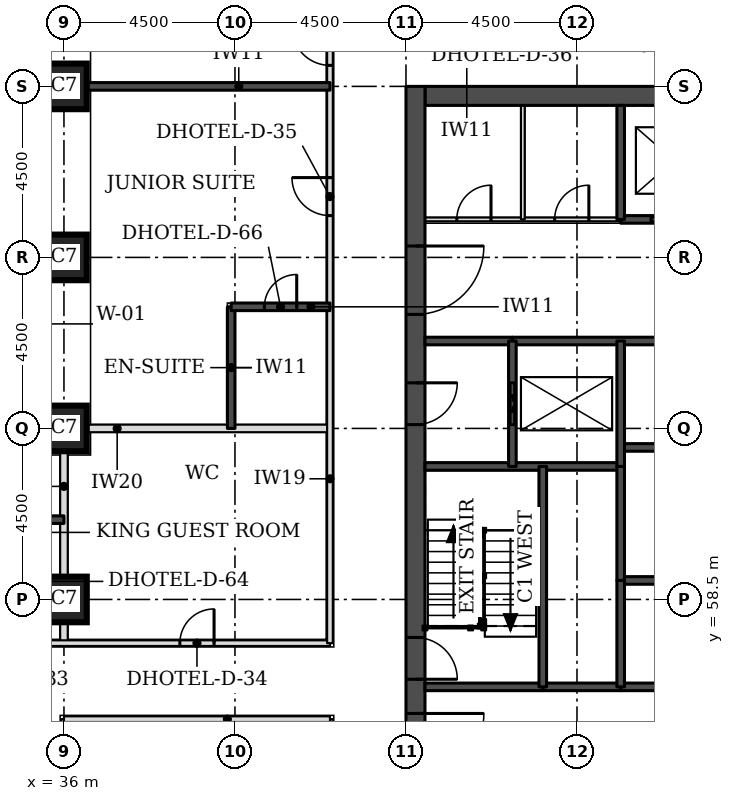
"""IFC4 building model, lengths in metres.
Left out: names, types, materials, properties, quantities, classifications, styles, units other than length and angle.
Written with IfcOpenShell. Run it as: python <this file> out.ifc"""

import sys

from ifc_helpers import new_model, si_unit, direction, frame, frame_2d, origin, origin_2d, place, context, subcontext, project, spatial, rectangle, extrude, element, fill, save


model = new_model("IFC4")
c1 = context("Model", 3, precision=1e-05, world=origin(), true_north=direction((0.0, 1.0)))
c2 = subcontext(c1, "Body", "Model", "MODEL_VIEW")
j1 = project(units=[si_unit("LENGTHUNIT", "METRE"), si_unit("PLANEANGLEUNIT", "RADIAN")], contexts=[c1])
p1 = place(None, origin())
s1 = spatial("IfcSite", under=j1, at=p1, CompositionType="ELEMENT")
p2 = place(p1, origin())
s2 = spatial("IfcBuilding", under=s1, at=p2, CompositionType="ELEMENT")
p3 = place(p2, frame((0.0, 0.0, 59.4)))
s3 = spatial("IfcBuildingStorey", under=s2, at=p3, CompositionType="ELEMENT", Elevation=59.4)
for number, where, z_axis, x_axis in (
    (1, (36.0, 58.5, 0.0), (0.0, 0.0, 1.0), (1.0, 0.0, 0.0)),
    (2, (36.0, 63.0, 0.0), (0.0, 0.0, 1.0), (1.0, 0.0, 0.0)),
    (3, (36.0, 67.5, 0.0), (0.0, 0.0, 1.0), (1.0, 0.0, 0.0)),
    (4, (36.0, 72.0, 0.0), (0.0, 0.0, 1.0), (1.0, 0.0, 0.0)),
):
    element("IfcColumn", number, at=place(p3, frame(where, z_axis=z_axis, x_axis=x_axis)), inside=s3, PredefinedType="COLUMN", context=c2, shape_type="SweptSolid", body=[
        extrude(rectangle(XDim=1.2, YDim=1.2, at=origin_2d()), origin(), (0.0, 0.0, 1.0), 3.3),
    ])
p4 = place(p3, frame((45.5, 71.75, 0.0), z_axis=(0.0, 0.0, 1.0), x_axis=(1.0, 0.0, 0.0)))
e5 = element("IfcWall", 5, at=p4, inside=s3, PredefinedType="SHEAR", context=c2, shape_type="SweptSolid", body=[
    extrude(rectangle(XDim=21.5, YDim=0.5, at=frame_2d((10.75, 0.0))), origin(), (0.0, 0.0, 1.0), 3.3),
])
p5 = place(p3, frame((45.25, 49.5, 0.0), z_axis=(0.0, 0.0, 1.0), x_axis=(0.0, 1.0, 0.0)))
e6 = element("IfcWall", 6, at=p5, inside=s3, PredefinedType="SHEAR", context=c2, shape_type="SweptSolid", body=[
    extrude(rectangle(XDim=22.5, YDim=0.5, at=frame_2d((11.25, 0.0))), origin(), (0.0, 0.0, 1.0), 3.3),
])
p6 = place(p5, frame((4.2, 0.0, 0.0)))
e7 = element("IfcOpeningElement", 7, at=p6, cuts=e6, PredefinedType="OPENING", context=c2, shape_type="SweptSolid", body=[
    extrude(rectangle(XDim=1.8, YDim=2.1, at=frame_2d((0.9, 1.05))), frame((0.0, 0.26, 0.0), z_axis=(0.0, -1.0, 0.0), x_axis=(1.0, 0.0, 0.0)), (0.0, 0.0, 1.0), 0.52),
])
p7 = place(p5, frame((6.9, 0.0, 0.0)))
e8 = element("IfcOpeningElement", 8, at=p7, cuts=e6, PredefinedType="OPENING", context=c2, shape_type="SweptSolid", body=[
    extrude(rectangle(XDim=1.1, YDim=2.1, at=frame_2d((0.55, 1.05))), frame((0.0, 0.26, 0.0), z_axis=(0.0, -1.0, 0.0), x_axis=(1.0, 0.0, 0.0)), (0.0, 0.0, 1.0), 0.52),
])
p8 = place(p5, frame((13.6, 0.0, 0.0)))
e9 = element("IfcOpeningElement", 9, at=p8, cuts=e6, PredefinedType="OPENING", context=c2, shape_type="SweptSolid", body=[
    extrude(rectangle(XDim=1.1, YDim=2.1, at=frame_2d((0.55, 1.05))), frame((0.0, 0.26, 0.0), z_axis=(0.0, -1.0, 0.0), x_axis=(1.0, 0.0, 0.0)), (0.0, 0.0, 1.0), 0.52),
])
p9 = place(p5, frame((16.5, 0.0, 0.0)))
e10 = element("IfcOpeningElement", 10, at=p9, cuts=e6, PredefinedType="OPENING", context=c2, shape_type="SweptSolid", body=[
    extrude(rectangle(XDim=1.8, YDim=2.1, at=frame_2d((0.9, 1.05))), frame((0.0, 0.26, 0.0), z_axis=(0.0, -1.0, 0.0), x_axis=(1.0, 0.0, 0.0)), (0.0, 0.0, 1.0), 0.52),
])
p10 = place(p3, frame((36.0, 57.35, 0.0), z_axis=(0.0, 0.0, 1.0), x_axis=(0.0, 1.0, 0.0)))
e11 = element("IfcWall", 11, at=p10, inside=s3, PredefinedType="PARTITIONING", context=c2, shape_type="SweptSolid", body=[
    extrude(rectangle(XDim=5.05, YDim=0.2, at=frame_2d((2.525, 0.0))), origin(), (0.0, 0.0, 1.0), 2.33),
])
p11 = place(p3, frame((36.6, 63.0, 0.0), z_axis=(0.0, 0.0, 1.0), x_axis=(1.0, 0.0, 0.0)))
e12 = element("IfcWall", 12, at=p11, inside=s3, PredefinedType="PARTITIONING", context=c2, shape_type="SweptSolid", body=[
    extrude(rectangle(XDim=6.4, YDim=0.2, at=frame_2d((3.2, 0.0))), origin(), (0.0, 0.0, 1.0), 3.08),
])
p12 = place(p3, frame((43.0, 47.5, 0.0), z_axis=(0.0, 0.0, 1.0), x_axis=(0.0, 1.0, 0.0)))
e13 = element("IfcWall", 13, at=p12, inside=s3, PredefinedType="PARTITIONING", context=c2, shape_type="SweptSolid", body=[
    extrude(rectangle(XDim=7.85, YDim=0.15, at=frame_2d((3.925, 0.0))), origin(), (0.0, 0.0, 1.0), 3.08),
])
p13 = place(p12, frame((3.475, 0.0, 0.0)))
e14 = element("IfcOpeningElement", 14, at=p13, cuts=e13, PredefinedType="OPENING", context=c2, shape_type="SweptSolid", body=[
    extrude(rectangle(XDim=0.9, YDim=2.1, at=frame_2d((0.45, 1.05))), frame((0.0, 0.085, 0.0), z_axis=(0.0, -1.0, 0.0), x_axis=(1.0, 0.0, 0.0)), (0.0, 0.0, 1.0), 0.17),
])
p14 = place(p3, frame((36.0, 54.05, 0.0), z_axis=(0.0, 0.0, 1.0), x_axis=(0.0, 1.0, 0.0)))
e15 = element("IfcWall", 15, at=p14, inside=s3, PredefinedType="PARTITIONING", context=c2, shape_type="SweptSolid", body=[
    extrude(rectangle(XDim=1.3, YDim=0.15, at=frame_2d((0.65, 0.0))), origin(), (0.0, 0.0, 1.0), 2.33),
])
p15 = place(p3, frame((36.0, 55.35, 0.0), z_axis=(0.0, 0.0, 1.0), x_axis=(1.0, 0.0, 0.0)))
e16 = element("IfcWall", 16, at=p15, inside=s3, PredefinedType="PARTITIONING", context=c2, shape_type="SweptSolid", body=[
    extrude(rectangle(XDim=7.0, YDim=0.15, at=frame_2d((3.5, 0.0))), origin(), (0.0, 0.0, 1.0), 3.08),
])
p16 = place(p3, frame((29.38, 57.35, 0.0), z_axis=(0.0, 0.0, 1.0), x_axis=(1.0, 0.0, 0.0)))
e17 = element("IfcWall", 17, at=p16, inside=s3, PredefinedType="PARTITIONING", context=c2, shape_type="SweptSolid", body=[
    extrude(rectangle(XDim=13.62, YDim=0.15, at=frame_2d((6.81, 0.0))), origin(), (0.0, 0.0, 1.0), 3.08),
])
p17 = place(p16, frame((2.82, 0.0, 0.0)))
e18 = element("IfcOpeningElement", 18, at=p17, cuts=e17, PredefinedType="OPENING", context=c2, shape_type="SweptSolid", body=[
    extrude(rectangle(XDim=1.0, YDim=2.1, at=frame_2d((0.5, 1.05))), frame((0.0, 0.085, 0.0), z_axis=(0.0, -1.0, 0.0), x_axis=(1.0, 0.0, 0.0)), (0.0, 0.0, 1.0), 0.17),
])
p18 = place(p16, frame((0.67, 0.0, 0.0)))
e19 = element("IfcOpeningElement", 19, at=p18, cuts=e17, PredefinedType="OPENING", context=c2, shape_type="SweptSolid", body=[
    extrude(rectangle(XDim=1.0, YDim=2.1, at=frame_2d((0.5, 1.05))), frame((0.0, 0.085, 0.0), z_axis=(0.0, -1.0, 0.0), x_axis=(1.0, 0.0, 0.0)), (0.0, 0.0, 1.0), 0.17),
])
p19 = place(p16, frame((9.67, 0.0, 0.0)))
e20 = element("IfcOpeningElement", 20, at=p19, cuts=e17, PredefinedType="OPENING", context=c2, shape_type="SweptSolid", body=[
    extrude(rectangle(XDim=0.9, YDim=2.1, at=frame_2d((0.45, 1.05))), frame((0.0, 0.085, 0.0), z_axis=(0.0, -1.0, 0.0), x_axis=(1.0, 0.0, 0.0)), (0.0, 0.0, 1.0), 0.17),
])
p20 = place(p3, frame((43.0, 57.35, 0.0), z_axis=(0.0, 0.0, 1.0), x_axis=(0.0, 1.0, 0.0)))
e21 = element("IfcWall", 21, at=p20, inside=s3, PredefinedType="PARTITIONING", context=c2, shape_type="SweptSolid", body=[
    extrude(rectangle(XDim=16.65, YDim=0.15, at=frame_2d((8.325, 0.0))), origin(), (0.0, 0.0, 1.0), 3.08),
])
p21 = place(p20, frame((11.25, 0.0, 0.0)))
e22 = element("IfcOpeningElement", 22, at=p21, cuts=e21, PredefinedType="OPENING", context=c2, shape_type="SweptSolid", body=[
    extrude(rectangle(XDim=1.0, YDim=2.1, at=frame_2d((0.5, 1.05))), frame((0.0, 0.085, 0.0), z_axis=(0.0, -1.0, 0.0), x_axis=(1.0, 0.0, 0.0)), (0.0, 0.0, 1.0), 0.17),
])
p22 = place(p20, frame((15.203, 0.0, 0.0)))
e23 = element("IfcOpeningElement", 23, at=p22, cuts=e21, PredefinedType="OPENING", context=c2, shape_type="SweptSolid", body=[
    extrude(rectangle(XDim=1.0, YDim=2.1, at=frame_2d((0.5, 1.05))), frame((0.0, 0.085, 0.0), z_axis=(0.0, -1.0, 0.0), x_axis=(1.0, 0.0, 0.0)), (0.0, 0.0, 1.0), 0.17),
])
p23 = place(p3, frame((33.9, 60.6, 0.0), z_axis=(0.0, 0.0, 1.0), x_axis=(1.0, 0.0, 0.0)))
e24 = element("IfcWall", 24, at=p23, inside=s3, PredefinedType="SOLIDWALL", context=c2, shape_type="SweptSolid", body=[
    extrude(rectangle(XDim=2.1, YDim=0.2, at=frame_2d((1.05, 0.0))), origin(), (0.0, 0.0, 1.0), 3.08),
])
p24 = place(p3, frame((40.4, 63.0, 0.0), z_axis=(0.0, 0.0, 1.0), x_axis=(0.0, 1.0, 0.0)))
e25 = element("IfcWall", 25, at=p24, inside=s3, PredefinedType="SOLIDWALL", context=c2, shape_type="SweptSolid", body=[
    extrude(rectangle(XDim=3.2, YDim=0.2, at=frame_2d((1.6, 0.0))), origin(), (0.0, 0.0, 1.0), 3.08),
])
p25 = place(p3, frame((40.4, 66.2, 0.0), z_axis=(0.0, 0.0, 1.0), x_axis=(1.0, 0.0, 0.0)))
e26 = element("IfcWall", 26, at=p25, inside=s3, PredefinedType="SOLIDWALL", context=c2, shape_type="SweptSolid", body=[
    extrude(rectangle(XDim=2.6, YDim=0.2, at=frame_2d((1.3, 0.0))), origin(), (0.0, 0.0, 1.0), 3.08),
])
p26 = place(p25, frame((0.875, 0.0, 0.0)))
e27 = element("IfcOpeningElement", 27, at=p26, cuts=e26, PredefinedType="OPENING", context=c2, shape_type="SweptSolid", body=[
    extrude(rectangle(XDim=0.85, YDim=2.1, at=frame_2d((0.425, 1.05))), frame((0.0, 0.11, 0.0), z_axis=(0.0, -1.0, 0.0), x_axis=(1.0, 0.0, 0.0)), (0.0, 0.0, 1.0), 0.22),
])
p27 = place(p3, frame((36.6, 72.0, 0.0), z_axis=(0.0, 0.0, 1.0), x_axis=(1.0, 0.0, 0.0)))
e28 = element("IfcWall", 28, at=p27, inside=s3, PredefinedType="SOLIDWALL", context=c2, shape_type="SweptSolid", body=[
    extrude(rectangle(XDim=6.4, YDim=0.2, at=frame_2d((3.2, 0.0))), origin(), (0.0, 0.0, 1.0), 3.08),
])
p28 = place(p3, frame((48.6, 56.2, 0.0), z_axis=(0.0, 0.0, 1.0), x_axis=(1.0, 0.0, 0.0)))
e29 = element("IfcWall", 29, at=p28, inside=s3, PredefinedType="SOLIDWALL", context=c2, shape_type="SweptSolid", body=[
    extrude(rectangle(XDim=2.05, YDim=0.2, at=frame_2d((1.025, 0.0))), origin(), (0.0, 0.0, 1.0), 3.08),
])
p29 = place(p3, frame((45.5, 56.2, 0.0), z_axis=(0.0, 0.0, 1.0), x_axis=(1.0, 0.0, 0.0)))
e30 = element("IfcWall", 30, at=p29, inside=s3, PredefinedType="SOLIDWALL", context=c2, shape_type="SweptSolid", body=[
    extrude(rectangle(XDim=3.1, YDim=0.2, at=frame_2d((1.55, 0.0))), origin(), (0.0, 0.0, 1.0), 3.08),
])
p30 = place(p3, frame((50.65, 56.2, 0.0), z_axis=(0.0, 0.0, 1.0), x_axis=(1.0, 0.0, 0.0)))
e31 = element("IfcWall", 31, at=p30, inside=s3, PredefinedType="SOLIDWALL", context=c2, shape_type="SweptSolid", body=[
    extrude(rectangle(XDim=11.2, YDim=0.2, at=frame_2d((5.6, 0.0))), origin(), (0.0, 0.0, 1.0), 3.08),
])
p31 = place(p3, frame((50.65, 59.0, 0.0), z_axis=(0.0, 0.0, 1.0), x_axis=(1.0, 0.0, 0.0)))
e32 = element("IfcWall", 32, at=p31, inside=s3, PredefinedType="SOLIDWALL", context=c2, shape_type="SweptSolid", body=[
    extrude(rectangle(XDim=11.2, YDim=0.2, at=frame_2d((5.6, 0.0))), origin(), (0.0, 0.0, 1.0), 3.3),
])
p32 = place(p3, frame((45.5, 62.0, 0.0), z_axis=(0.0, 0.0, 1.0), x_axis=(1.0, 0.0, 0.0)))
e33 = element("IfcWall", 33, at=p32, inside=s3, PredefinedType="SOLIDWALL", context=c2, shape_type="SweptSolid", body=[
    extrude(rectangle(XDim=5.15, YDim=0.2, at=frame_2d((2.575, 0.0))), origin(), (0.0, 0.0, 1.0), 3.08),
])
p33 = place(p3, frame((50.65, 62.5, 0.0), z_axis=(0.0, 0.0, 1.0), x_axis=(1.0, 0.0, 0.0)))
e34 = element("IfcWall", 34, at=p33, inside=s3, PredefinedType="SOLIDWALL", context=c2, shape_type="SweptSolid", body=[
    extrude(rectangle(XDim=11.2, YDim=0.2, at=frame_2d((5.6, 0.0))), origin(), (0.0, 0.0, 1.0), 3.3),
])
p34 = place(p3, frame((45.5, 65.3, 0.0), z_axis=(0.0, 0.0, 1.0), x_axis=(1.0, 0.0, 0.0)))
e35 = element("IfcWall", 35, at=p34, inside=s3, PredefinedType="SOLIDWALL", context=c2, shape_type="SweptSolid", body=[
    extrude(rectangle(XDim=2.3, YDim=0.2, at=frame_2d((1.15, 0.0))), origin(), (0.0, 0.0, 1.0), 3.08),
])
p35 = place(p3, frame((47.8, 65.3, 0.0), z_axis=(0.0, 0.0, 1.0), x_axis=(1.0, 0.0, 0.0)))
e36 = element("IfcWall", 36, at=p35, inside=s3, PredefinedType="SOLIDWALL", context=c2, shape_type="SweptSolid", body=[
    extrude(rectangle(XDim=16.9, YDim=0.2, at=frame_2d((8.45, 0.0))), origin(), (0.0, 0.0, 1.0), 3.08),
])
p36 = place(p3, frame((45.5, 68.5, 0.0), z_axis=(0.0, 0.0, 1.0), x_axis=(1.0, 0.0, 0.0)))
e37 = element("IfcWall", 37, at=p36, inside=s3, PredefinedType="PARTITIONING", context=c2, shape_type="SweptSolid", body=[
    extrude(rectangle(XDim=5.15, YDim=0.1, at=frame_2d((2.575, 0.0))), origin(), (0.0, 0.0, 1.0), 3.08),
])
p37 = place(p36, frame((0.837, 0.0, 0.0)))
e38 = element("IfcOpeningElement", 38, at=p37, cuts=e37, PredefinedType="OPENING", context=c2, shape_type="SweptSolid", body=[
    extrude(rectangle(XDim=0.9, YDim=2.1, at=frame_2d((0.45, 1.05))), frame((0.0, 0.06, 0.0), z_axis=(0.0, -1.0, 0.0), x_axis=(1.0, 0.0, 0.0)), (0.0, 0.0, 1.0), 0.12),
])
p38 = place(p36, frame((3.413, 0.0, 0.0)))
e39 = element("IfcOpeningElement", 39, at=p38, cuts=e37, PredefinedType="OPENING", context=c2, shape_type="SweptSolid", body=[
    extrude(rectangle(XDim=0.9, YDim=2.1, at=frame_2d((0.45, 1.05))), frame((0.0, 0.06, 0.0), z_axis=(0.0, -1.0, 0.0), x_axis=(1.0, 0.0, 0.0)), (0.0, 0.0, 1.0), 0.12),
])
p39 = place(p3, frame((50.65, 68.5, 0.0), z_axis=(0.0, 0.0, 1.0), x_axis=(1.0, 0.0, 0.0)))
e40 = element("IfcWall", 40, at=p39, inside=s3, PredefinedType="SOLIDWALL", context=c2, shape_type="SweptSolid", body=[
    extrude(rectangle(XDim=11.2, YDim=0.2, at=frame_2d((5.6, 0.0))), origin(), (0.0, 0.0, 1.0), 3.08),
])
p40 = place(p39, frame((0.8, 0.0, 0.0)))
e41 = element("IfcOpeningElement", 41, at=p40, cuts=e40, PredefinedType="OPENING", context=c2, shape_type="SweptSolid", body=[
    extrude(rectangle(XDim=1.2, YDim=2.1, at=frame_2d((0.6, 1.05))), frame((0.0, 0.11, 0.0), z_axis=(0.0, -1.0, 0.0), x_axis=(1.0, 0.0, 0.0)), (0.0, 0.0, 1.0), 0.22),
])
p41 = place(p39, frame((3.6, 0.0, 0.0)))
e42 = element("IfcOpeningElement", 42, at=p41, cuts=e40, PredefinedType="OPENING", context=c2, shape_type="SweptSolid", body=[
    extrude(rectangle(XDim=1.2, YDim=2.1, at=frame_2d((0.6, 1.05))), frame((0.0, 0.11, 0.0), z_axis=(0.0, -1.0, 0.0), x_axis=(1.0, 0.0, 0.0)), (0.0, 0.0, 1.0), 0.22),
])
p42 = place(p39, frame((6.4, 0.0, 0.0)))
e43 = element("IfcOpeningElement", 43, at=p42, cuts=e40, PredefinedType="OPENING", context=c2, shape_type="SweptSolid", body=[
    extrude(rectangle(XDim=1.2, YDim=2.1, at=frame_2d((0.6, 1.05))), frame((0.0, 0.11, 0.0), z_axis=(0.0, -1.0, 0.0), x_axis=(1.0, 0.0, 0.0)), (0.0, 0.0, 1.0), 0.22),
])
p43 = place(p39, frame((9.2, 0.0, 0.0)))
e44 = element("IfcOpeningElement", 44, at=p43, cuts=e40, PredefinedType="OPENING", context=c2, shape_type="SweptSolid", body=[
    extrude(rectangle(XDim=1.2, YDim=2.1, at=frame_2d((0.6, 1.05))), frame((0.0, 0.11, 0.0), z_axis=(0.0, -1.0, 0.0), x_axis=(1.0, 0.0, 0.0)), (0.0, 0.0, 1.0), 0.22),
])
p44 = place(p3, frame((47.8, 62.0, 0.0), z_axis=(0.0, 0.0, 1.0), x_axis=(0.0, 1.0, 0.0)))
e45 = element("IfcWall", 45, at=p44, inside=s3, PredefinedType="SOLIDWALL", context=c2, shape_type="SweptSolid", body=[
    extrude(rectangle(XDim=3.3, YDim=0.2, at=frame_2d((1.65, 0.0))), origin(), (0.0, 0.0, 1.0), 3.08),
])
p45 = place(p44, frame((1.1, 0.0, 0.0)))
e46 = element("IfcOpeningElement", 46, at=p45, cuts=e45, PredefinedType="OPENING", context=c2, shape_type="SweptSolid", body=[
    extrude(rectangle(XDim=1.1, YDim=2.1, at=frame_2d((0.55, 1.05))), frame((0.0, 0.11, 0.0), z_axis=(0.0, -1.0, 0.0), x_axis=(1.0, 0.0, 0.0)), (0.0, 0.0, 1.0), 0.22),
])
p46 = place(p3, frame((48.075, 68.5, 0.0), z_axis=(0.0, 0.0, 1.0), x_axis=(0.0, 1.0, 0.0)))
e47 = element("IfcWall", 47, at=p46, inside=s3, PredefinedType="PARTITIONING", context=c2, shape_type="SweptSolid", body=[
    extrude(rectangle(XDim=3.0, YDim=0.1, at=frame_2d((1.5, 0.0))), origin(), (0.0, 0.0, 1.0), 3.08),
])
p47 = place(p3, frame((48.6, 56.2, 0.0), z_axis=(0.0, 0.0, 1.0), x_axis=(0.0, 1.0, 0.0)))
e48 = element("IfcWall", 48, at=p47, inside=s3, PredefinedType="SOLIDWALL", context=c2, shape_type="SweptSolid", body=[
    extrude(rectangle(XDim=5.8, YDim=0.2, at=frame_2d((2.9, 0.0))), origin(), (0.0, 0.0, 1.0), 3.08),
])
p48 = place(p3, frame((50.65, 59.0, 0.0), z_axis=(0.0, 0.0, 1.0), x_axis=(0.0, 1.0, 0.0)))
e49 = element("IfcWall", 49, at=p48, inside=s3, PredefinedType="SOLIDWALL", context=c2, shape_type="SweptSolid", body=[
    extrude(rectangle(XDim=3.0, YDim=0.2, at=frame_2d((1.5, 0.0))), origin(), (0.0, 0.0, 1.0), 3.3),
])
p49 = place(p3, frame((50.65, 56.2, 0.0), z_axis=(0.0, 0.0, 1.0), x_axis=(0.0, 1.0, 0.0)))
e50 = element("IfcWall", 50, at=p49, inside=s3, PredefinedType="SOLIDWALL", context=c2, shape_type="SweptSolid", body=[
    extrude(rectangle(XDim=2.8, YDim=0.2, at=frame_2d((1.4, 0.0))), origin(), (0.0, 0.0, 1.0), 3.08),
])
p50 = place(p3, frame((50.65, 62.0, 0.0), z_axis=(0.0, 0.0, 1.0), x_axis=(0.0, 1.0, 0.0)))
e51 = element("IfcWall", 51, at=p50, inside=s3, PredefinedType="SOLIDWALL", context=c2, shape_type="SweptSolid", body=[
    extrude(rectangle(XDim=3.3, YDim=0.2, at=frame_2d((1.65, 0.0))), origin(), (0.0, 0.0, 1.0), 3.08),
])
p51 = place(p3, frame((50.65, 68.5, 0.0), z_axis=(0.0, 0.0, 1.0), x_axis=(0.0, 1.0, 0.0)))
e52 = element("IfcWall", 52, at=p51, inside=s3, PredefinedType="SOLIDWALL", context=c2, shape_type="SweptSolid", body=[
    extrude(rectangle(XDim=3.0, YDim=0.2, at=frame_2d((1.5, 0.0))), origin(), (0.0, 0.0, 1.0), 3.08),
])
p52 = place(p21, origin())
e53 = element("IfcDoor", 53, at=p52, inside=s3, OperationType="SINGLE_SWING_RIGHT", PredefinedType="DOOR", context=c2, shape_type="SweptSolid", body=[
    extrude(rectangle(XDim=1.0, YDim=2.1, at=frame_2d((0.5, 1.05))), frame((0.0, 0.025, 0.0), z_axis=(0.0, -1.0, 0.0), x_axis=(1.0, 0.0, 0.0)), (0.0, 0.0, 1.0), 0.05),
])
fill(e22, e53)
p53 = place(p26, origin())
e54 = element("IfcDoor", 54, at=p53, inside=s3, OperationType="SINGLE_SWING_RIGHT", PredefinedType="DOOR", context=c2, shape_type="SweptSolid", body=[
    extrude(rectangle(XDim=0.85, YDim=2.1, at=frame_2d((0.425, 1.05))), frame((0.0, 0.025, 0.0), z_axis=(0.0, -1.0, 0.0), x_axis=(1.0, 0.0, 0.0)), (0.0, 0.0, 1.0), 0.05),
])
fill(e27, e54)
p54 = place(p22, origin())
e55 = element("IfcDoor", 55, at=p54, inside=s3, OperationType="SINGLE_SWING_RIGHT", PredefinedType="DOOR", context=c2, shape_type="SweptSolid", body=[
    extrude(rectangle(XDim=1.0, YDim=2.1, at=frame_2d((0.5, 1.05))), frame((0.0, 0.025, 0.0), z_axis=(0.0, -1.0, 0.0), x_axis=(1.0, 0.0, 0.0)), (0.0, 0.0, 1.0), 0.05),
])
fill(e23, e55)
p55 = place(p19, origin())
e56 = element("IfcDoor", 56, at=p55, inside=s3, OperationType="SINGLE_SWING_RIGHT", PredefinedType="DOOR", context=c2, shape_type="SweptSolid", body=[
    extrude(rectangle(XDim=0.9, YDim=2.1, at=frame_2d((0.45, 1.05))), frame((0.0, 0.025, 0.0), z_axis=(0.0, -1.0, 0.0), x_axis=(1.0, 0.0, 0.0)), (0.0, 0.0, 1.0), 0.05),
])
fill(e20, e56)
p56 = place(p40, origin())
e57 = element("IfcDoor", 57, at=p56, inside=s3, OperationType="DOUBLE_DOOR_SLIDING", PredefinedType="DOOR", context=c2, shape_type="SweptSolid", body=[
    extrude(rectangle(XDim=1.2, YDim=2.1, at=frame_2d((0.6, 1.05))), frame((0.0, 0.025, 0.0), z_axis=(0.0, -1.0, 0.0), x_axis=(1.0, 0.0, 0.0)), (0.0, 0.0, 1.0), 0.05),
])
fill(e41, e57)
p57 = place(p45, origin())
e58 = element("IfcDoor", 58, at=p57, inside=s3, OperationType="DOUBLE_DOOR_SLIDING", PredefinedType="DOOR", context=c2, shape_type="SweptSolid", body=[
    extrude(rectangle(XDim=1.1, YDim=2.1, at=frame_2d((0.55, 1.05))), frame((0.0, 0.025, 0.0), z_axis=(0.0, -1.0, 0.0), x_axis=(1.0, 0.0, 0.0)), (0.0, 0.0, 1.0), 0.05),
])
fill(e46, e58)
p58 = place(p6, frame((1.8, 0.0, 0.0), z_axis=(0.0, 0.0, 1.0), x_axis=(-1.0, 0.0, 0.0)))
e59 = element("IfcDoor", 59, at=p58, inside=s3, OperationType="SINGLE_SWING_LEFT", PredefinedType="DOOR", context=c2, shape_type="SweptSolid", body=[
    extrude(rectangle(XDim=1.8, YDim=2.1, at=frame_2d((0.9, 1.05))), frame((0.0, 0.025, 0.0), z_axis=(0.0, -1.0, 0.0), x_axis=(1.0, 0.0, 0.0)), (0.0, 0.0, 1.0), 0.05),
])
fill(e7, e59)
p59 = place(p7, frame((1.1, 0.0, 0.0), z_axis=(0.0, 0.0, 1.0), x_axis=(-1.0, 0.0, 0.0)))
e60 = element("IfcDoor", 60, at=p59, inside=s3, OperationType="SINGLE_SWING_RIGHT", PredefinedType="DOOR", context=c2, shape_type="SweptSolid", body=[
    extrude(rectangle(XDim=1.1, YDim=2.1, at=frame_2d((0.55, 1.05))), frame((0.0, 0.025, 0.0), z_axis=(0.0, -1.0, 0.0), x_axis=(1.0, 0.0, 0.0)), (0.0, 0.0, 1.0), 0.05),
])
fill(e8, e60)
p60 = place(p8, frame((1.1, 0.0, 0.0), z_axis=(0.0, 0.0, 1.0), x_axis=(-1.0, 0.0, 0.0)))
e61 = element("IfcDoor", 61, at=p60, inside=s3, OperationType="SINGLE_SWING_LEFT", PredefinedType="DOOR", context=c2, shape_type="SweptSolid", body=[
    extrude(rectangle(XDim=1.1, YDim=2.1, at=frame_2d((0.55, 1.05))), frame((0.0, 0.025, 0.0), z_axis=(0.0, -1.0, 0.0), x_axis=(1.0, 0.0, 0.0)), (0.0, 0.0, 1.0), 0.05),
])
fill(e9, e61)
p61 = place(p9, frame((1.8, 0.0, 0.0), z_axis=(0.0, 0.0, 1.0), x_axis=(-1.0, 0.0, 0.0)))
e62 = element("IfcDoor", 62, at=p61, inside=s3, OperationType="SINGLE_SWING_LEFT", PredefinedType="DOOR", context=c2, shape_type="SweptSolid", body=[
    extrude(rectangle(XDim=1.8, YDim=2.1, at=frame_2d((0.9, 1.05))), frame((0.0, 0.025, 0.0), z_axis=(0.0, -1.0, 0.0), x_axis=(1.0, 0.0, 0.0)), (0.0, 0.0, 1.0), 0.05),
])
fill(e10, e62)
p62 = place(p37, origin())
e63 = element("IfcDoor", 63, at=p62, inside=s3, OperationType="SINGLE_SWING_RIGHT", PredefinedType="DOOR", context=c2, shape_type="SweptSolid", body=[
    extrude(rectangle(XDim=0.9, YDim=2.1, at=frame_2d((0.45, 1.05))), frame((0.0, 0.025, 0.0), z_axis=(0.0, -1.0, 0.0), x_axis=(1.0, 0.0, 0.0)), (0.0, 0.0, 1.0), 0.05),
])
fill(e38, e63)
p63 = place(p38, origin())
e64 = element("IfcDoor", 64, at=p63, inside=s3, OperationType="SINGLE_SWING_RIGHT", PredefinedType="DOOR", context=c2, shape_type="SweptSolid", body=[
    extrude(rectangle(XDim=0.9, YDim=2.1, at=frame_2d((0.45, 1.05))), frame((0.0, 0.025, 0.0), z_axis=(0.0, -1.0, 0.0), x_axis=(1.0, 0.0, 0.0)), (0.0, 0.0, 1.0), 0.05),
])
fill(e39, e64)
save(model, sys.argv[1])
